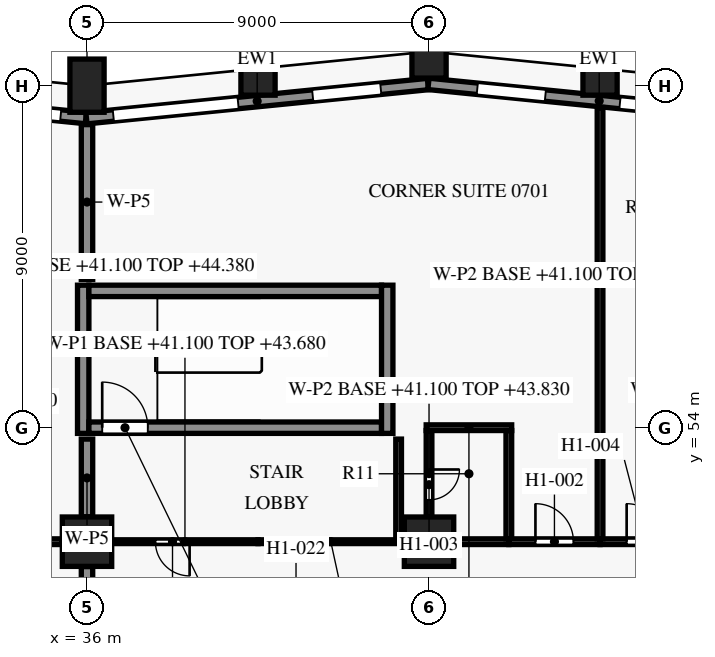
"""IFC4 building model, lengths in metres.
Left out: names, types, materials, properties, quantities, classifications, styles, units other than length and angle.
Written with IfcOpenShell. Run it as: python <this file> out.ifc"""

import sys

from ifc_helpers import new_model, si_unit, direction, frame, frame_2d, origin, origin_2d, place, context, subcontext, project, spatial, rectangle, extrude, element, fill, save


model = new_model("IFC4")
c1 = context("Model", 3, precision=1e-05, world=origin(), true_north=direction((0.0, 1.0)))
c2 = subcontext(c1, "Body", "Model", "MODEL_VIEW")
j1 = project(units=[si_unit("LENGTHUNIT", "METRE"), si_unit("PLANEANGLEUNIT", "RADIAN")], contexts=[c1])
p1 = place(None, origin())
s1 = spatial("IfcSite", under=j1, at=p1, CompositionType="ELEMENT")
p2 = place(p1, origin())
s2 = spatial("IfcBuilding", under=s1, at=p2, CompositionType="ELEMENT")
p3 = place(p2, frame((0.0, 0.0, 41.1)))
s3 = spatial("IfcBuildingStorey", under=s2, at=p3, CompositionType="ELEMENT", Elevation=41.1)
for number, where, z_axis, x_axis in (
    (1, (49.5, 63.45, 0.0), (0.0, 0.0, 1.0), (-0.995, 0.1, 0.0)),
    (2, (45.0, 63.9, 0.0), (0.0, 0.0, 1.0), (-1.0, 0.0, 0.0)),
    (3, (40.5, 63.45, 0.0), (0.0, 0.0, 1.0), (-0.995, -0.1, 0.0)),
    (4, (36.0, 63.0, 0.0), (0.0, 0.0, 1.0), (-1.0, 0.0, 0.0)),
):
    element("IfcColumn", number, at=place(p3, frame(where, z_axis=z_axis, x_axis=x_axis)), inside=s3, PredefinedType="COLUMN", context=c2, shape_type="SweptSolid", body=[
        extrude(rectangle(XDim=0.9, YDim=1.4, at=origin_2d()), origin(), (0.0, 0.0, 1.0), 3.6),
    ])
for number, where, z_axis, x_axis in (
    (5, (36.0, 51.0, 0.0), (0.0, 0.0, 1.0), (1.0, 0.0, 0.0)),
    (6, (45.0, 51.0, 0.0), (0.0, 0.0, 1.0), (1.0, 0.0, 0.0)),
):
    element("IfcColumn", number, at=place(p3, frame(where, z_axis=z_axis, x_axis=x_axis)), inside=s3, PredefinedType="COLUMN", context=c2, shape_type="SweptSolid", body=[
        extrude(rectangle(XDim=1.3, YDim=1.3, at=origin_2d()), origin(), (0.0, 0.0, 1.0), 3.6),
    ])
p4 = place(p3, frame((44.985, 63.047, 0.0), z_axis=(0.0, 0.0, 1.0), x_axis=(0.995035316196, -0.099522457379, 0.0)))
e7 = element("IfcWall", 7, at=p4, inside=s3, PredefinedType="SOLIDWALL", context=c2, shape_type="SweptSolid", body=[
    extrude(rectangle(XDim=9.03, YDim=0.3, at=frame_2d((4.515, 0.0))), origin(), (0.0, 0.0, 1.0), 2.95),
])
p5 = place(p4, frame((1.291, 0.0, 0.75)))
e8 = element("IfcOpeningElement", 8, at=p5, cuts=e7, PredefinedType="OPENING", context=c2, shape_type="SweptSolid", body=[
    extrude(rectangle(XDim=1.8, YDim=1.8, at=frame_2d((0.9, 0.9))), frame((0.0, 0.16, 0.0), z_axis=(0.0, -1.0, 0.0), x_axis=(1.0, 0.0, 0.0)), (0.0, 0.0, 1.0), 0.32),
])
p6 = place(p4, frame((5.064, 0.0, 0.15)))
e9 = element("IfcOpeningElement", 9, at=p6, cuts=e7, PredefinedType="OPENING", context=c2, shape_type="SweptSolid", body=[
    extrude(rectangle(XDim=3.3, YDim=2.4, at=frame_2d((1.65, 1.2))), frame((0.0, 0.16, 0.0), z_axis=(0.0, -1.0, 0.0), x_axis=(1.0, 0.0, 0.0)), (0.0, 0.0, 1.0), 0.32),
])
p7 = place(p3, frame((35.985, 62.144, 0.0), z_axis=(0.0, 0.0, 1.0), x_axis=(0.995037993253, 0.099495688264, 0.0)))
e10 = element("IfcWall", 10, at=p7, inside=s3, PredefinedType="SOLIDWALL", context=c2, shape_type="SweptSolid", body=[
    extrude(rectangle(XDim=9.03, YDim=0.3, at=frame_2d((4.515, 0.0))), origin(), (0.0, 0.0, 1.0), 2.95),
])
p8 = place(p7, frame((0.711, 0.0, 0.15)))
e11 = element("IfcOpeningElement", 11, at=p8, cuts=e10, PredefinedType="OPENING", context=c2, shape_type="SweptSolid", body=[
    extrude(rectangle(XDim=3.3, YDim=2.4, at=frame_2d((1.65, 1.2))), frame((0.0, 0.16, 0.0), z_axis=(0.0, -1.0, 0.0), x_axis=(1.0, 0.0, 0.0)), (0.0, 0.0, 1.0), 0.32),
])
p9 = place(p7, frame((5.984, 0.0, 0.75)))
e12 = element("IfcOpeningElement", 12, at=p9, cuts=e10, PredefinedType="OPENING", context=c2, shape_type="SweptSolid", body=[
    extrude(rectangle(XDim=1.8, YDim=1.8, at=frame_2d((0.9, 0.9))), frame((0.0, 0.16, 0.0), z_axis=(0.0, -1.0, 0.0), x_axis=(1.0, 0.0, 0.0)), (0.0, 0.0, 1.0), 0.32),
])
p10 = place(p3, frame((27.065, 63.039, 0.0), z_axis=(0.0, 0.0, 1.0), x_axis=(0.995036379926, -0.099511821531, 0.0)))
e13 = element("IfcWall", 13, at=p10, inside=s3, PredefinedType="SOLIDWALL", context=c2, shape_type="SweptSolid", body=[
    extrude(rectangle(XDim=8.95, YDim=0.3, at=frame_2d((4.475, 0.0))), origin(), (0.0, 0.0, 1.0), 2.95),
])
p11 = place(p10, frame((1.211, 0.0, 0.75)))
e14 = element("IfcOpeningElement", 14, at=p11, cuts=e13, PredefinedType="OPENING", context=c2, shape_type="SweptSolid", body=[
    extrude(rectangle(XDim=1.8, YDim=1.8, at=frame_2d((0.9, 0.9))), frame((0.0, 0.16, 0.0), z_axis=(0.0, -1.0, 0.0), x_axis=(1.0, 0.0, 0.0)), (0.0, 0.0, 1.0), 0.32),
])
p12 = place(p10, frame((4.984, 0.0, 0.15)))
e15 = element("IfcOpeningElement", 15, at=p12, cuts=e13, PredefinedType="OPENING", context=c2, shape_type="SweptSolid", body=[
    extrude(rectangle(XDim=3.3, YDim=2.4, at=frame_2d((1.65, 1.2))), frame((0.0, 0.16, 0.0), z_axis=(0.0, -1.0, 0.0), x_axis=(1.0, 0.0, 0.0)), (0.0, 0.0, 1.0), 0.32),
])
p13 = place(p3, frame((36.05, 54.0, 0.0), z_axis=(0.0, 0.0, 1.0), x_axis=(1.0, 0.0, 0.0)))
e16 = element("IfcWall", 16, at=p13, inside=s3, PredefinedType="SHEAR", context=c2, shape_type="SweptSolid", body=[
    extrude(rectangle(XDim=7.7, YDim=0.3, at=frame_2d((3.85, 0.0))), origin(), (0.0, 0.0, 1.0), 3.3),
])
p14 = place(p13, frame((0.35, 0.0, 0.0)))
e17 = element("IfcOpeningElement", 17, at=p14, cuts=e16, PredefinedType="OPENING", context=c2, shape_type="SweptSolid", body=[
    extrude(rectangle(XDim=1.2, YDim=2.2, at=frame_2d((0.6, 1.1))), frame((0.0, 0.16, 0.0), z_axis=(0.0, -1.0, 0.0), x_axis=(1.0, 0.0, 0.0)), (0.0, 0.0, 1.0), 0.32),
])
p15 = place(p3, frame((36.05, 57.6, 0.0), z_axis=(0.0, 0.0, 1.0), x_axis=(1.0, 0.0, 0.0)))
e18 = element("IfcWall", 18, at=p15, inside=s3, PredefinedType="SHEAR", context=c2, shape_type="SweptSolid", body=[
    extrude(rectangle(XDim=7.7, YDim=0.3, at=frame_2d((3.85, 0.0))), origin(), (0.0, 0.0, 1.0), 3.3),
])
for number, where, z_axis, x_axis in (
    (19, (35.9, 53.85, 0.0), (0.0, 0.0, 1.0), (0.0, 1.0, 0.0)),
    (20, (43.9, 53.85, 0.0), (0.0, 0.0, 1.0), (0.0, 1.0, 0.0)),
):
    element("IfcWall", number, at=place(p3, frame(where, z_axis=z_axis, x_axis=x_axis)), inside=s3, PredefinedType="SHEAR", context=c2, shape_type="SweptSolid", body=[
        extrude(rectangle(XDim=3.9, YDim=0.3, at=frame_2d((1.95, 0.0))), origin(), (0.0, 0.0, 1.0), 3.3),
    ])
p16 = place(p3, frame((36.0, 50.345, 0.0), z_axis=(0.0, 0.0, 1.0), x_axis=(0.0, -1.0, 0.0)))
e21 = element("IfcWall", 21, at=p16, inside=s3, PredefinedType="PARTITIONING", context=c2, shape_type="SweptSolid", body=[
    extrude(rectangle(XDim=3.295, YDim=0.3, at=frame_2d((1.647, 0.0))), origin(), (0.0, 0.0, 1.0), 2.58),
])
p17 = place(p3, frame((33.6, 51.0, 0.0), z_axis=(0.0, 0.0, 1.0), x_axis=(1.0, 0.0, 0.0)))
e22 = element("IfcWall", 22, at=p17, inside=s3, PredefinedType="PARTITIONING", context=c2, shape_type="SweptSolid", body=[
    extrude(rectangle(XDim=1.745, YDim=0.15, at=frame_2d((0.873, 0.0))), origin(), (0.0, 0.0, 1.0), 3.28),
])
p18 = place(p3, frame((40.5, 51.0, 0.0), z_axis=(0.0, 0.0, 1.0), x_axis=(-1.0, 0.0, 0.0)))
e23 = element("IfcWall", 23, at=p18, inside=s3, PredefinedType="PARTITIONING", context=c2, shape_type="SweptSolid", body=[
    extrude(rectangle(XDim=3.845, YDim=0.1, at=frame_2d((1.922, 0.0))), origin(), (0.0, 0.0, 1.0), 2.58),
])
p19 = place(p18, frame((1.8, 0.0, 0.0)))
e24 = element("IfcOpeningElement", 24, at=p19, cuts=e23, PredefinedType="OPENING", context=c2, shape_type="SweptSolid", body=[
    extrude(rectangle(XDim=0.9, YDim=2.1, at=frame_2d((0.45, 1.05))), frame((0.0, 0.06, 0.0), z_axis=(0.0, -1.0, 0.0), x_axis=(1.0, 0.0, 0.0)), (0.0, 0.0, 1.0), 0.12),
])
p20 = place(p3, frame((44.33, 51.0, 0.0), z_axis=(0.0, 0.0, 1.0), x_axis=(-1.0, 0.0, 0.0)))
e25 = element("IfcWall", 25, at=p20, inside=s3, PredefinedType="PARTITIONING", context=c2, shape_type="SweptSolid", body=[
    extrude(rectangle(XDim=3.83, YDim=0.1, at=frame_2d((1.915, 0.0))), origin(), (0.0, 0.0, 1.0), 2.58),
])
p21 = place(p3, frame((45.655, 51.0, 0.0), z_axis=(0.0, 0.0, 1.0), x_axis=(1.0, 0.0, 0.0)))
e26 = element("IfcWall", 26, at=p21, inside=s3, PredefinedType="PARTITIONING", context=c2, shape_type="SweptSolid", body=[
    extrude(rectangle(XDim=1.445, YDim=0.15, at=frame_2d((0.723, 0.0))), origin(), (0.0, 0.0, 1.0), 2.58),
])
p22 = place(p3, frame((47.1, 51.0, 0.0), z_axis=(0.0, 0.0, 1.0), x_axis=(1.0, 0.0, 0.0)))
e27 = element("IfcWall", 27, at=p22, inside=s3, PredefinedType="PARTITIONING", context=c2, shape_type="SweptSolid", body=[
    extrude(rectangle(XDim=2.4, YDim=0.15, at=frame_2d((1.2, 0.0))), origin(), (0.0, 0.0, 1.0), 2.58),
])
p23 = place(p22, frame((0.7, 0.0, 0.0)))
e28 = element("IfcOpeningElement", 28, at=p23, cuts=e27, PredefinedType="OPENING", context=c2, shape_type="SweptSolid", body=[
    extrude(rectangle(XDim=1.0, YDim=2.1, at=frame_2d((0.5, 1.05))), frame((0.0, 0.085, 0.0), z_axis=(0.0, -1.0, 0.0), x_axis=(1.0, 0.0, 0.0)), (0.0, 0.0, 1.0), 0.17),
])
p24 = place(p3, frame((49.5, 51.0, 0.0), z_axis=(0.0, 0.0, 1.0), x_axis=(1.0, 0.0, 0.0)))
e29 = element("IfcWall", 29, at=p24, inside=s3, PredefinedType="PARTITIONING", context=c2, shape_type="SweptSolid", body=[
    extrude(rectangle(XDim=2.4, YDim=0.15, at=frame_2d((1.2, 0.0))), origin(), (0.0, 0.0, 1.0), 2.58),
])
p25 = place(p24, frame((0.7, 0.0, 0.0)))
e30 = element("IfcOpeningElement", 30, at=p25, cuts=e29, PredefinedType="OPENING", context=c2, shape_type="SweptSolid", body=[
    extrude(rectangle(XDim=1.0, YDim=2.1, at=frame_2d((0.5, 1.05))), frame((0.0, 0.085, 0.0), z_axis=(0.0, -1.0, 0.0), x_axis=(1.0, 0.0, 0.0)), (0.0, 0.0, 1.0), 0.17),
])
p26 = place(p3, frame((47.1, 51.075, 0.0), z_axis=(0.0, 0.0, 1.0), x_axis=(0.0, 1.0, 0.0)))
e31 = element("IfcWall", 31, at=p26, inside=s3, PredefinedType="PARTITIONING", context=c2, shape_type="SweptSolid", body=[
    extrude(rectangle(XDim=2.85, YDim=0.15, at=frame_2d((1.425, 0.0))), origin(), (0.0, 0.0, 1.0), 2.58),
])
p27 = place(p3, frame((36.0, 53.7, 0.0), z_axis=(0.0, 0.0, 1.0), x_axis=(0.0, -1.0, 0.0)))
e32 = element("IfcWall", 32, at=p27, inside=s3, PredefinedType="PARTITIONING", context=c2, shape_type="SweptSolid", body=[
    extrude(rectangle(XDim=2.045, YDim=0.3, at=frame_2d((1.022, 0.0))), origin(), (0.0, 0.0, 1.0), 2.58),
])
p28 = place(p3, frame((44.2, 53.7, 0.0), z_axis=(0.0, 0.0, 1.0), x_axis=(0.0, -1.0, 0.0)))
e33 = element("IfcWall", 33, at=p28, inside=s3, PredefinedType="PARTITIONING", context=c2, shape_type="SweptSolid", body=[
    extrude(rectangle(XDim=2.625, YDim=0.15, at=frame_2d((1.312, 0.0))), origin(), (0.0, 0.0, 1.0), 2.58),
])
p29 = place(p3, frame((45.0, 53.925, 0.0), z_axis=(0.0, 0.0, 1.0), x_axis=(0.0, -1.0, 0.0)))
e34 = element("IfcWall", 34, at=p29, inside=s3, PredefinedType="PARTITIONING", context=c2, shape_type="SweptSolid", body=[
    extrude(rectangle(XDim=2.27, YDim=0.15, at=frame_2d((1.135, 0.0))), origin(), (0.0, 0.0, 1.0), 2.73),
])
p30 = place(p29, frame((1.025, 0.0, 0.0)))
e35 = element("IfcOpeningElement", 35, at=p30, cuts=e34, PredefinedType="OPENING", context=c2, shape_type="SweptSolid", body=[
    extrude(rectangle(XDim=0.8, YDim=2.1, at=frame_2d((0.4, 1.05))), frame((0.0, 0.085, 0.0), z_axis=(0.0, -1.0, 0.0), x_axis=(1.0, 0.0, 0.0)), (0.0, 0.0, 1.0), 0.17),
])
p31 = place(p3, frame((47.175, 54.0, 0.0), z_axis=(0.0, 0.0, 1.0), x_axis=(-1.0, 0.0, 0.0)))
e36 = element("IfcWall", 36, at=p31, inside=s3, PredefinedType="PARTITIONING", context=c2, shape_type="SweptSolid", body=[
    extrude(rectangle(XDim=2.25, YDim=0.15, at=frame_2d((1.125, 0.0))), origin(), (0.0, 0.0, 1.0), 2.73),
])
p32 = place(p3, frame((36.0, 61.975, 0.0), z_axis=(0.0, 0.0, 1.0), x_axis=(0.0, -1.0, 0.0)))
e37 = element("IfcWall", 37, at=p32, inside=s3, PredefinedType="PARTITIONING", context=c2, shape_type="SweptSolid", body=[
    extrude(rectangle(XDim=4.075, YDim=0.3, at=frame_2d((2.038, 0.0))), origin(), (0.0, 0.0, 1.0), 2.58),
])
p33 = place(p3, frame((49.5, 62.425, 0.0), z_axis=(0.0, 0.0, 1.0), x_axis=(0.0, -1.0, 0.0)))
e38 = element("IfcWall", 38, at=p33, inside=s3, PredefinedType="PARTITIONING", context=c2, shape_type="SweptSolid", body=[
    extrude(rectangle(XDim=11.35, YDim=0.15, at=frame_2d((5.675, 0.0))), origin(), (0.0, 0.0, 1.0), 2.58),
])
p34 = place(p5, origin())
e39 = element("IfcWindow", 39, at=p34, inside=s3, PartitioningType="SINGLE_PANEL", PredefinedType="WINDOW", context=c2, shape_type="SweptSolid", body=[
    extrude(rectangle(XDim=1.8, YDim=1.8, at=frame_2d((0.9, 0.9))), frame((0.0, 0.03, 0.0), z_axis=(0.0, -1.0, 0.0), x_axis=(1.0, 0.0, 0.0)), (0.0, 0.0, 1.0), 0.06),
])
fill(e8, e39)
p35 = place(p6, origin())
e40 = element("IfcWindow", 40, at=p35, inside=s3, PartitioningType="SINGLE_PANEL", PredefinedType="WINDOW", context=c2, shape_type="SweptSolid", body=[
    extrude(rectangle(XDim=3.3, YDim=2.4, at=frame_2d((1.65, 1.2))), frame((0.0, 0.03, 0.0), z_axis=(0.0, -1.0, 0.0), x_axis=(1.0, 0.0, 0.0)), (0.0, 0.0, 1.0), 0.06),
])
fill(e9, e40)
p36 = place(p8, origin())
e41 = element("IfcWindow", 41, at=p36, inside=s3, PartitioningType="SINGLE_PANEL", PredefinedType="WINDOW", context=c2, shape_type="SweptSolid", body=[
    extrude(rectangle(XDim=3.3, YDim=2.4, at=frame_2d((1.65, 1.2))), frame((0.0, 0.03, 0.0), z_axis=(0.0, -1.0, 0.0), x_axis=(1.0, 0.0, 0.0)), (0.0, 0.0, 1.0), 0.06),
])
fill(e11, e41)
p37 = place(p9, origin())
e42 = element("IfcWindow", 42, at=p37, inside=s3, PartitioningType="SINGLE_PANEL", PredefinedType="WINDOW", context=c2, shape_type="SweptSolid", body=[
    extrude(rectangle(XDim=1.8, YDim=1.8, at=frame_2d((0.9, 0.9))), frame((0.0, 0.03, 0.0), z_axis=(0.0, -1.0, 0.0), x_axis=(1.0, 0.0, 0.0)), (0.0, 0.0, 1.0), 0.06),
])
fill(e12, e42)
p38 = place(p12, origin())
e43 = element("IfcWindow", 43, at=p38, inside=s3, PartitioningType="SINGLE_PANEL", PredefinedType="WINDOW", context=c2, shape_type="SweptSolid", body=[
    extrude(rectangle(XDim=3.3, YDim=2.4, at=frame_2d((1.65, 1.2))), frame((0.0, 0.03, 0.0), z_axis=(0.0, -1.0, 0.0), x_axis=(1.0, 0.0, 0.0)), (0.0, 0.0, 1.0), 0.06),
])
fill(e15, e43)
p39 = place(p14, origin())
e44 = element("IfcDoor", 44, at=p39, inside=s3, OperationType="SINGLE_SWING_LEFT", PredefinedType="DOOR", context=c2, shape_type="SweptSolid", body=[
    extrude(rectangle(XDim=1.2, YDim=2.2, at=frame_2d((0.6, 1.1))), frame((0.0, 0.025, 0.0), z_axis=(0.0, -1.0, 0.0), x_axis=(1.0, 0.0, 0.0)), (0.0, 0.0, 1.0), 0.05),
])
fill(e17, e44)
p40 = place(p19, origin())
e45 = element("IfcDoor", 45, at=p40, inside=s3, OperationType="SINGLE_SWING_LEFT", PredefinedType="DOOR", context=c2, shape_type="SweptSolid", body=[
    extrude(rectangle(XDim=0.9, YDim=2.1, at=frame_2d((0.45, 1.05))), frame((0.0, 0.025, 0.0), z_axis=(0.0, -1.0, 0.0), x_axis=(1.0, 0.0, 0.0)), (0.0, 0.0, 1.0), 0.05),
])
fill(e24, e45)
p41 = place(p23, origin())
e46 = element("IfcDoor", 46, at=p41, inside=s3, OperationType="SINGLE_SWING_LEFT", PredefinedType="DOOR", context=c2, shape_type="SweptSolid", body=[
    extrude(rectangle(XDim=1.0, YDim=2.1, at=frame_2d((0.5, 1.05))), frame((0.0, 0.025, 0.0), z_axis=(0.0, -1.0, 0.0), x_axis=(1.0, 0.0, 0.0)), (0.0, 0.0, 1.0), 0.05),
])
fill(e28, e46)
p42 = place(p30, origin())
e47 = element("IfcDoor", 47, at=p42, inside=s3, OperationType="SINGLE_SWING_RIGHT", PredefinedType="DOOR", context=c2, shape_type="SweptSolid", body=[
    extrude(rectangle(XDim=0.8, YDim=2.1, at=frame_2d((0.4, 1.05))), frame((0.0, 0.025, 0.0), z_axis=(0.0, -1.0, 0.0), x_axis=(1.0, 0.0, 0.0)), (0.0, 0.0, 1.0), 0.05),
])
fill(e35, e47)
p43 = place(p25, origin())
e48 = element("IfcDoor", 48, at=p43, inside=s3, OperationType="SINGLE_SWING_LEFT", PredefinedType="DOOR", context=c2, shape_type="SweptSolid", body=[
    extrude(rectangle(XDim=1.0, YDim=2.1, at=frame_2d((0.5, 1.05))), frame((0.0, 0.025, 0.0), z_axis=(0.0, -1.0, 0.0), x_axis=(1.0, 0.0, 0.0)), (0.0, 0.0, 1.0), 0.05),
])
fill(e30, e48)
save(model, sys.argv[1])
